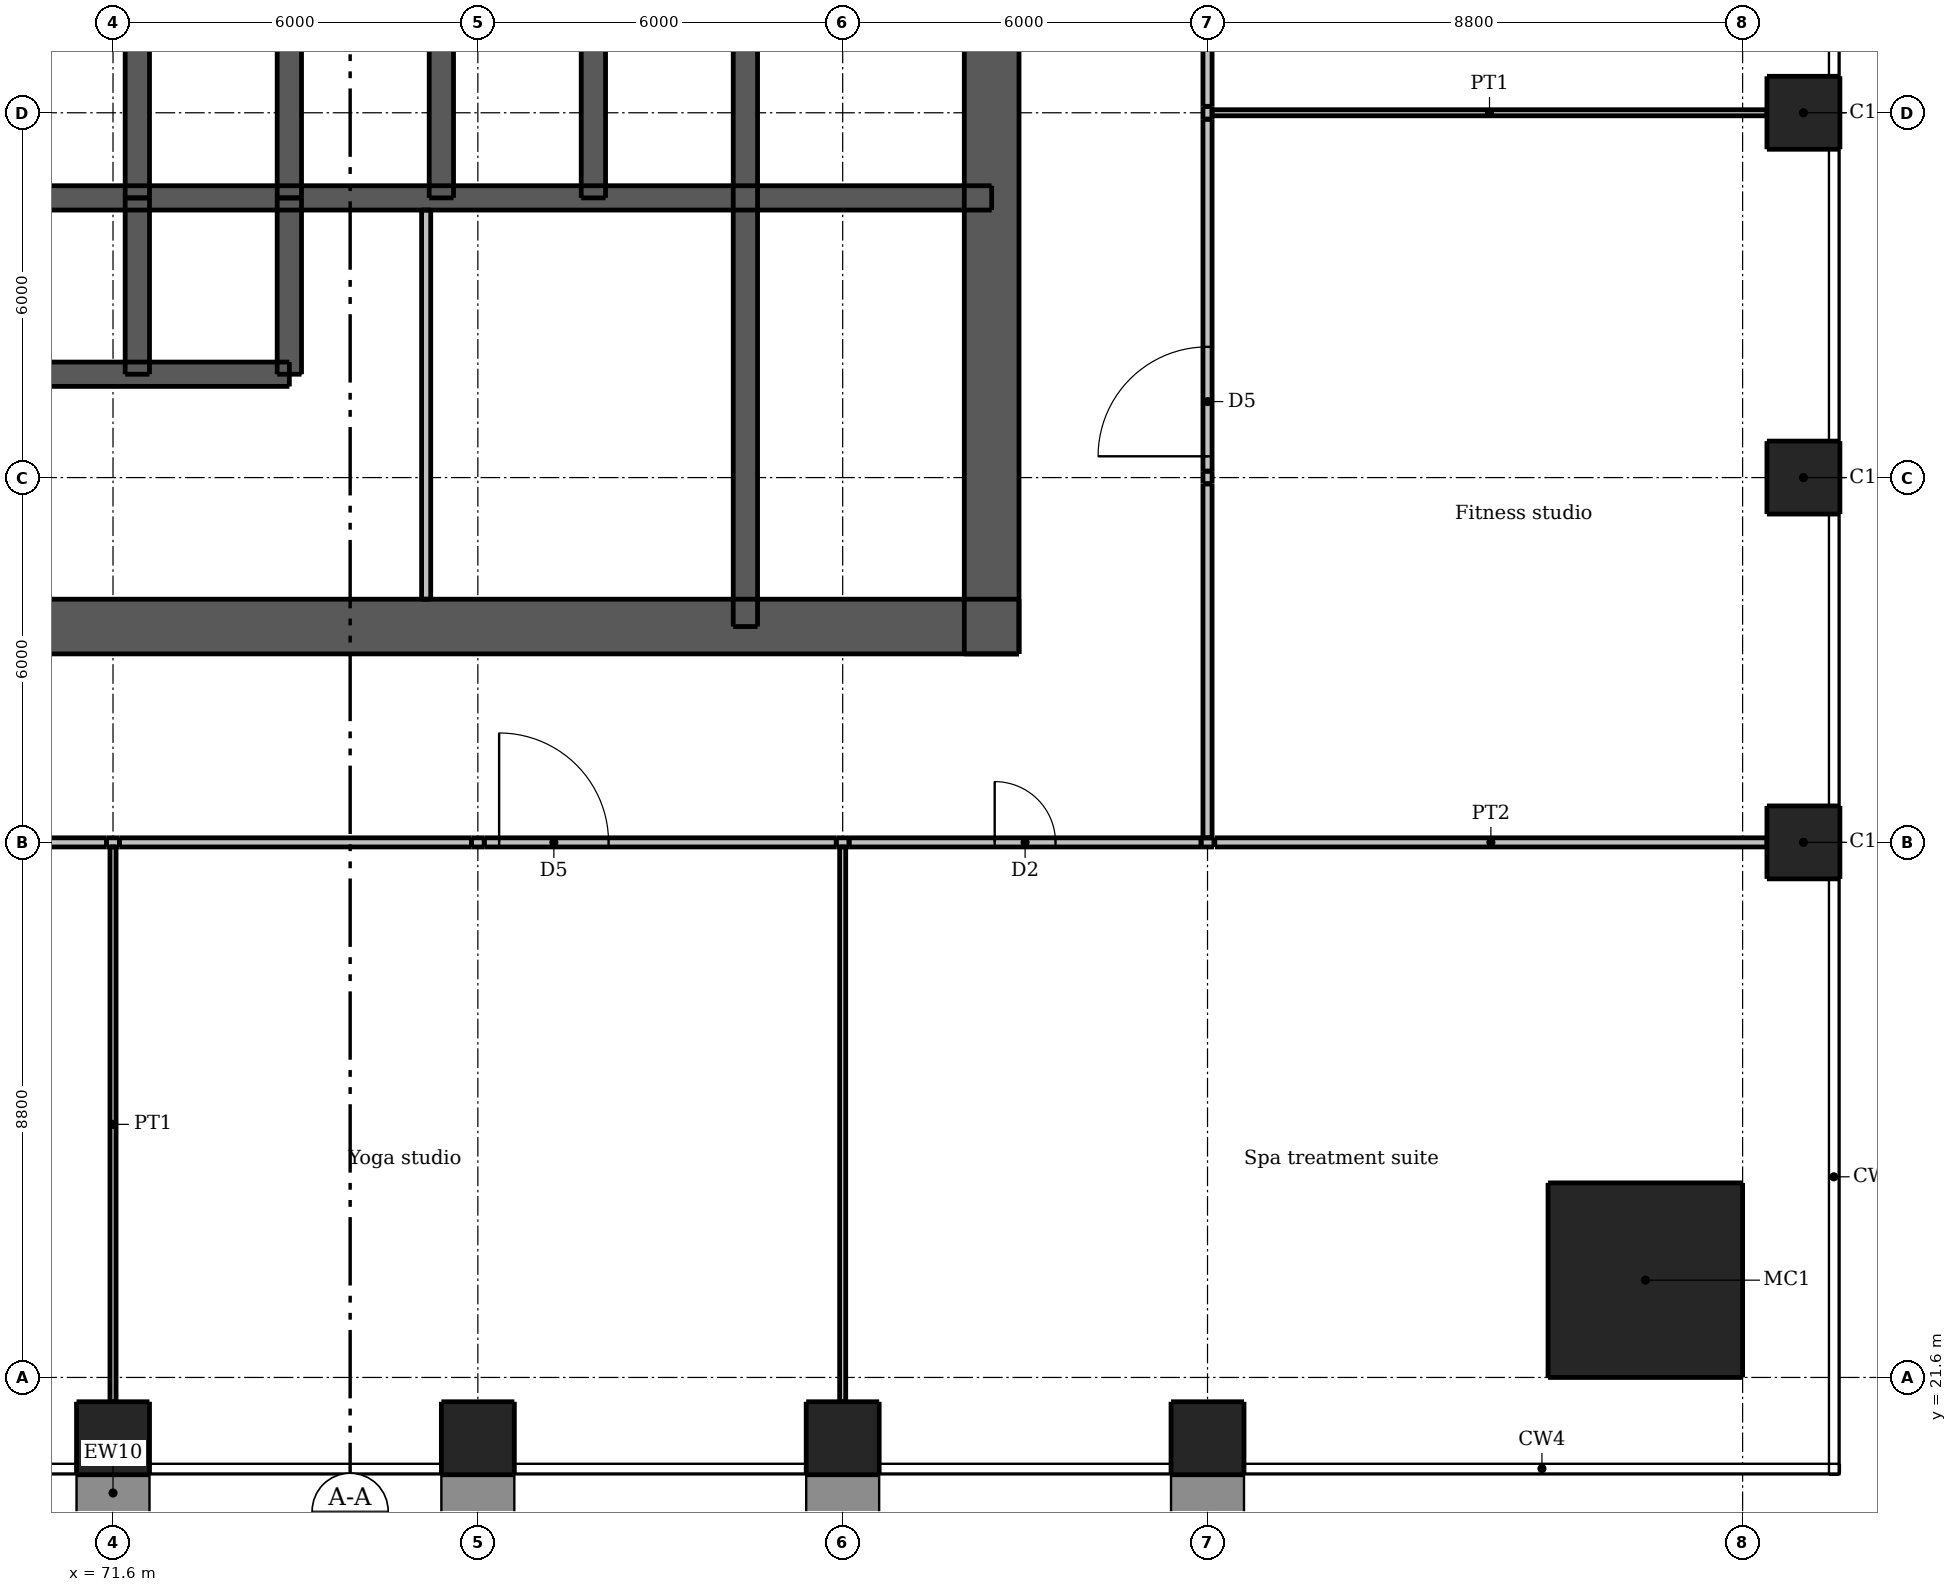
"""IFC4 building model, lengths in metres.
Left out: names, types, materials, properties, quantities, classifications, styles, units other than length and angle.
Written with IfcOpenShell. Run it as: python <this file> out.ifc"""

import sys

from ifc_helpers import new_model, si_unit, direction, frame, frame_2d, origin, origin_2d, place, context, subcontext, project, spatial, rectangle, extrude, element, fill, save


model = new_model("IFC4")
c1 = context("Model", 3, precision=1e-05, world=origin(), true_north=direction((0.0, 1.0)))
c2 = subcontext(c1, "Body", "Model", "MODEL_VIEW")
j1 = project(units=[si_unit("LENGTHUNIT", "METRE"), si_unit("PLANEANGLEUNIT", "RADIAN")], contexts=[c1])
p1 = place(None, origin())
s1 = spatial("IfcSite", under=j1, at=p1, CompositionType="ELEMENT")
p2 = place(p1, origin())
s2 = spatial("IfcBuilding", under=s1, at=p2, CompositionType="ELEMENT")
p3 = place(p2, frame((0.0, 0.0, 10.0)))
s3 = spatial("IfcBuildingStorey", under=s2, at=p3, CompositionType="ELEMENT", Elevation=10.0)
p4 = place(p3, frame((62.5, 33.95, 0.0), z_axis=(0.0, 0.0, 1.0), x_axis=(1.0, 0.0, 0.0)))
e1 = element("IfcWall", 1, at=p4, inside=s3, PredefinedType="SHEAR", context=c2, shape_type="SweptSolid", body=[
    extrude(rectangle(XDim=24.0, YDim=0.9, at=frame_2d((12.0, 0.0))), origin(), (0.0, 0.0, 1.0), 4.2),
])
p5 = place(p4, frame((2.05, 0.0, 0.0)))
e2 = element("IfcOpeningElement", 2, at=p5, cuts=e1, PredefinedType="OPENING", context=c2, shape_type="SweptSolid", body=[
    extrude(rectangle(XDim=1.1, YDim=2.1, at=frame_2d((0.55, 1.05))), frame((0.0, 0.46, 0.0), z_axis=(0.0, -1.0, 0.0), x_axis=(1.0, 0.0, 0.0)), (0.0, 0.0, 1.0), 0.92),
])
p6 = place(p4, frame((20.85, 0.0, 0.0)))
e3 = element("IfcOpeningElement", 3, at=p6, cuts=e1, PredefinedType="OPENING", context=c2, shape_type="SweptSolid", body=[
    extrude(rectangle(XDim=1.1, YDim=2.1, at=frame_2d((0.55, 1.05))), frame((0.0, 0.46, 0.0), z_axis=(0.0, -1.0, 0.0), x_axis=(1.0, 0.0, 0.0)), (0.0, 0.0, 1.0), 0.92),
])
p7 = place(p4, frame((8.0, 0.0, 0.0)))
e4 = element("IfcOpeningElement", 4, at=p7, cuts=e1, PredefinedType="OPENING", context=c2, shape_type="SweptSolid", body=[
    extrude(rectangle(XDim=1.1, YDim=2.1, at=frame_2d((0.55, 1.05))), frame((0.0, 0.46, 0.0), z_axis=(0.0, -1.0, 0.0), x_axis=(1.0, 0.0, 0.0)), (0.0, 0.0, 1.0), 0.92),
])
p8 = place(p4, frame((16.363, 0.0, 0.0)))
e5 = element("IfcOpeningElement", 5, at=p8, cuts=e1, PredefinedType="OPENING", context=c2, shape_type="SweptSolid", body=[
    extrude(rectangle(XDim=0.9, YDim=2.1, at=frame_2d((0.45, 1.05))), frame((0.0, 0.46, 0.0), z_axis=(0.0, -1.0, 0.0), x_axis=(1.0, 0.0, 0.0)), (0.0, 0.0, 1.0), 0.92),
])
p9 = place(p3, frame((86.05, 33.5, 0.0), z_axis=(0.0, 0.0, 1.0), x_axis=(0.0, 1.0, 0.0)))
e6 = element("IfcWall", 6, at=p9, inside=s3, PredefinedType="SHEAR", context=c2, shape_type="SweptSolid", body=[
    extrude(rectangle(XDim=24.0, YDim=0.9, at=frame_2d((12.0, 0.0))), origin(), (0.0, 0.0, 1.0), 4.2),
])
p10 = place(p9, frame((11.2, 0.0, 0.0)))
e7 = element("IfcOpeningElement", 7, at=p10, cuts=e6, PredefinedType="OPENING", context=c2, shape_type="SweptSolid", body=[
    extrude(rectangle(XDim=1.6, YDim=2.1, at=frame_2d((0.8, 1.05))), frame((0.0, 0.46, 0.0), z_axis=(0.0, -1.0, 0.0), x_axis=(1.0, 0.0, 0.0)), (0.0, 0.0, 1.0), 0.92),
])
p11 = place(p3, frame((62.95, 41.0, 0.0), z_axis=(0.0, 0.0, 1.0), x_axis=(1.0, 0.0, 0.0)))
e8 = element("IfcWall", 8, at=p11, inside=s3, PredefinedType="SHEAR", context=c2, shape_type="SweptSolid", body=[
    extrude(rectangle(XDim=23.1, YDim=0.4, at=frame_2d((11.55, 0.0))), origin(), (0.0, 0.0, 1.0), 4.2),
])
p12 = place(p3, frame((82.0, 33.95, 0.0), z_axis=(0.0, 0.0, 1.0), x_axis=(0.0, 1.0, 0.0)))
e9 = element("IfcWall", 9, at=p12, inside=s3, PredefinedType="SHEAR", context=c2, shape_type="SweptSolid", body=[
    extrude(rectangle(XDim=9.95, YDim=0.4, at=frame_2d((4.975, 0.0))), origin(), (0.0, 0.0, 1.0), 4.2),
])
for number, where, z_axis, x_axis in (
    (10, (72.0, 41.0, 0.0), (0.0, 0.0, 1.0), (0.0, 1.0, 0.0)),
    (11, (74.5, 41.0, 0.0), (0.0, 0.0, 1.0), (0.0, 1.0, 0.0)),
    (12, (77.0, 41.0, 0.0), (0.0, 0.0, 1.0), (0.0, 1.0, 0.0)),
    (13, (79.5, 41.0, 0.0), (0.0, 0.0, 1.0), (0.0, 1.0, 0.0)),
):
    element("IfcWall", number, at=place(p3, frame(where, z_axis=z_axis, x_axis=x_axis)), inside=s3, PredefinedType="SHEAR", context=c2, shape_type="SweptSolid", body=[
        extrude(rectangle(XDim=2.9, YDim=0.4, at=frame_2d((1.45, 0.0))), origin(), (0.0, 0.0, 1.0), 4.2),
    ])
p13 = place(p3, frame((67.0, 38.1, 0.0), z_axis=(0.0, 0.0, 1.0), x_axis=(1.0, 0.0, 0.0)))
e14 = element("IfcWall", 14, at=p13, inside=s3, PredefinedType="SHEAR", context=c2, shape_type="SweptSolid", body=[
    extrude(rectangle(XDim=7.5, YDim=0.4, at=frame_2d((3.75, 0.0))), origin(), (0.0, 0.0, 1.0), 4.2),
])
p14 = place(p13, frame((0.7, 0.0, 0.0)))
e15 = element("IfcOpeningElement", 15, at=p14, cuts=e14, PredefinedType="OPENING", context=c2, shape_type="SweptSolid", body=[
    extrude(rectangle(XDim=1.1, YDim=2.1, at=frame_2d((0.55, 1.05))), frame((0.0, 0.21, 0.0), z_axis=(0.0, -1.0, 0.0), x_axis=(1.0, 0.0, 0.0)), (0.0, 0.0, 1.0), 0.42),
])
p15 = place(p13, frame((3.2, 0.0, 0.0)))
e16 = element("IfcOpeningElement", 16, at=p15, cuts=e14, PredefinedType="OPENING", context=c2, shape_type="SweptSolid", body=[
    extrude(rectangle(XDim=1.1, YDim=2.1, at=frame_2d((0.55, 1.05))), frame((0.0, 0.21, 0.0), z_axis=(0.0, -1.0, 0.0), x_axis=(1.0, 0.0, 0.0)), (0.0, 0.0, 1.0), 0.42),
])
p16 = place(p13, frame((5.65, 0.0, 0.0)))
e17 = element("IfcOpeningElement", 17, at=p16, cuts=e14, PredefinedType="OPENING", context=c2, shape_type="SweptSolid", body=[
    extrude(rectangle(XDim=1.2, YDim=2.1, at=frame_2d((0.6, 1.05))), frame((0.0, 0.21, 0.0), z_axis=(0.0, -1.0, 0.0), x_axis=(1.0, 0.0, 0.0)), (0.0, 0.0, 1.0), 0.42),
])
for number, where, z_axis, x_axis in (
    (18, (72.0, 38.1, 0.0), (0.0, 0.0, 1.0), (0.0, 1.0, 0.0)),
    (19, (74.5, 38.1, 0.0), (0.0, 0.0, 1.0), (0.0, 1.0, 0.0)),
):
    element("IfcWall", number, at=place(p3, frame(where, z_axis=z_axis, x_axis=x_axis)), inside=s3, PredefinedType="SHEAR", context=c2, shape_type="SweptSolid", body=[
        extrude(rectangle(XDim=2.9, YDim=0.4, at=frame_2d((1.45, 0.0))), origin(), (0.0, 0.0, 1.0), 4.2),
    ])
for number, where, z_axis, x_axis in (
    (20, (71.6, 20.6, 0.0), (0.0, 0.0, 1.0), (1.0, 0.0, 0.0)),
    (21, (77.6, 20.6, 0.0), (0.0, 0.0, 1.0), (1.0, 0.0, 0.0)),
    (22, (83.6, 20.6, 0.0), (0.0, 0.0, 1.0), (1.0, 0.0, 0.0)),
    (23, (89.6, 20.6, 0.0), (0.0, 0.0, 1.0), (1.0, 0.0, 0.0)),
    (24, (99.4, 30.4, 0.0), (0.0, 0.0, 1.0), (1.0, 0.0, 0.0)),
    (25, (99.4, 36.4, 0.0), (0.0, 0.0, 1.0), (1.0, 0.0, 0.0)),
    (26, (99.4, 42.4, 0.0), (0.0, 0.0, 1.0), (1.0, 0.0, 0.0)),
):
    element("IfcColumn", number, at=place(p3, frame(where, z_axis=z_axis, x_axis=x_axis)), inside=s3, PredefinedType="COLUMN", context=c2, shape_type="SweptSolid", body=[
        extrude(rectangle(XDim=1.2, YDim=1.2, at=origin_2d()), origin(), (0.0, 0.0, 1.0), 4.2),
    ])
p17 = place(p3, frame((96.8, 23.2, 0.0), z_axis=(0.0, 0.0, 1.0), x_axis=(1.0, 0.0, 0.0)))
e27 = element("IfcColumn", 27, at=p17, inside=s3, PredefinedType="COLUMN", context=c2, shape_type="SweptSolid", body=[
    extrude(rectangle(XDim=3.2, YDim=3.2, at=origin_2d()), origin(), (0.0, 0.0, 1.0), 4.2),
])
p18 = place(p3, frame((76.75, 34.4, 0.0), z_axis=(0.0, 0.0, 1.0), x_axis=(0.0, 1.0, 0.0)))
e28 = element("IfcWall", 28, at=p18, inside=s3, PredefinedType="PLUMBINGWALL", context=c2, shape_type="SweptSolid", body=[
    extrude(rectangle(XDim=6.4, YDim=0.15, at=frame_2d((3.2, 0.0))), origin(), (0.0, 0.0, 1.0), 4.2),
])
p19 = place(p3, frame((65.705, 30.4, 0.0), z_axis=(0.0, 0.0, 1.0), x_axis=(1.0, 0.0, 0.0)))
e29 = element("IfcWall", 29, at=p19, inside=s3, PredefinedType="PARTITIONING", context=c2, shape_type="SweptSolid", body=[
    extrude(rectangle(XDim=5.789, YDim=0.15, at=frame_2d((2.895, 0.0))), origin(), (0.0, 0.0, 1.0), 4.2),
])
p20 = place(p19, frame((0.245, 0.0, 0.0)))
e30 = element("IfcOpeningElement", 30, at=p20, cuts=e29, PredefinedType="OPENING", context=c2, shape_type="SweptSolid", body=[
    extrude(rectangle(XDim=1.8, YDim=2.1, at=frame_2d((0.9, 1.05))), frame((0.0, 0.085, 0.0), z_axis=(0.0, -1.0, 0.0), x_axis=(1.0, 0.0, 0.0)), (0.0, 0.0, 1.0), 0.17),
])
p21 = place(p3, frame((71.495, 30.4, 0.0), z_axis=(0.0, 0.0, 1.0), x_axis=(1.0, 0.0, 0.0)))
e31 = element("IfcWall", 31, at=p21, inside=s3, PredefinedType="PARTITIONING", context=c2, shape_type="SweptSolid", body=[
    extrude(rectangle(XDim=0.211, YDim=0.15, at=frame_2d((0.105, 0.0))), origin(), (0.0, 0.0, 1.0), 3.66),
])
p22 = place(p3, frame((71.705, 30.4, 0.0), z_axis=(0.0, 0.0, 1.0), x_axis=(1.0, 0.0, 0.0)))
e32 = element("IfcWall", 32, at=p22, inside=s3, PredefinedType="PARTITIONING", context=c2, shape_type="SweptSolid", body=[
    extrude(rectangle(XDim=5.789, YDim=0.15, at=frame_2d((2.895, 0.0))), origin(), (0.0, 0.0, 1.0), 4.2),
])
p23 = place(p3, frame((77.495, 30.4, 0.0), z_axis=(0.0, 0.0, 1.0), x_axis=(1.0, 0.0, 0.0)))
e33 = element("IfcWall", 33, at=p23, inside=s3, PredefinedType="PARTITIONING", context=c2, shape_type="SweptSolid", body=[
    extrude(rectangle(XDim=0.211, YDim=0.15, at=frame_2d((0.105, 0.0))), origin(), (0.0, 0.0, 1.0), 3.66),
])
p24 = place(p3, frame((77.705, 30.4, 0.0), z_axis=(0.0, 0.0, 1.0), x_axis=(1.0, 0.0, 0.0)))
e34 = element("IfcWall", 34, at=p24, inside=s3, PredefinedType="PARTITIONING", context=c2, shape_type="SweptSolid", body=[
    extrude(rectangle(XDim=5.789, YDim=0.15, at=frame_2d((2.895, 0.0))), origin(), (0.0, 0.0, 1.0), 4.2),
])
p25 = place(p24, frame((0.245, 0.0, 0.0)))
e35 = element("IfcOpeningElement", 35, at=p25, cuts=e34, PredefinedType="OPENING", context=c2, shape_type="SweptSolid", body=[
    extrude(rectangle(XDim=1.8, YDim=2.1, at=frame_2d((0.9, 1.05))), frame((0.0, 0.085, 0.0), z_axis=(0.0, -1.0, 0.0), x_axis=(1.0, 0.0, 0.0)), (0.0, 0.0, 1.0), 0.17),
])
p26 = place(p3, frame((83.495, 30.4, 0.0), z_axis=(0.0, 0.0, 1.0), x_axis=(1.0, 0.0, 0.0)))
e36 = element("IfcWall", 36, at=p26, inside=s3, PredefinedType="PARTITIONING", context=c2, shape_type="SweptSolid", body=[
    extrude(rectangle(XDim=0.211, YDim=0.15, at=frame_2d((0.105, 0.0))), origin(), (0.0, 0.0, 1.0), 3.66),
])
p27 = place(p3, frame((83.705, 30.4, 0.0), z_axis=(0.0, 0.0, 1.0), x_axis=(1.0, 0.0, 0.0)))
e37 = element("IfcWall", 37, at=p27, inside=s3, PredefinedType="PARTITIONING", context=c2, shape_type="SweptSolid", body=[
    extrude(rectangle(XDim=5.789, YDim=0.15, at=frame_2d((2.895, 0.0))), origin(), (0.0, 0.0, 1.0), 4.2),
])
p28 = place(p27, frame((2.395, 0.0, 0.0)))
e38 = element("IfcOpeningElement", 38, at=p28, cuts=e37, PredefinedType="OPENING", context=c2, shape_type="SweptSolid", body=[
    extrude(rectangle(XDim=1.0, YDim=2.1, at=frame_2d((0.5, 1.05))), frame((0.0, 0.085, 0.0), z_axis=(0.0, -1.0, 0.0), x_axis=(1.0, 0.0, 0.0)), (0.0, 0.0, 1.0), 0.17),
])
p29 = place(p3, frame((89.495, 30.4, 0.0), z_axis=(0.0, 0.0, 1.0), x_axis=(1.0, 0.0, 0.0)))
e39 = element("IfcWall", 39, at=p29, inside=s3, PredefinedType="PARTITIONING", context=c2, shape_type="SweptSolid", body=[
    extrude(rectangle(XDim=0.211, YDim=0.15, at=frame_2d((0.105, 0.0))), origin(), (0.0, 0.0, 1.0), 3.66),
])
p30 = place(p3, frame((89.72, 30.4, 0.0), z_axis=(0.0, 0.0, 1.0), x_axis=(1.0, 0.0, 0.0)))
e40 = element("IfcWall", 40, at=p30, inside=s3, PredefinedType="PARTITIONING", context=c2, shape_type="SweptSolid", body=[
    extrude(rectangle(XDim=9.08, YDim=0.15, at=frame_2d((4.54, 0.0))), origin(), (0.0, 0.0, 1.0), 3.667),
])
for number, where, z_axis, x_axis in (
    (41, (89.675, 42.4, 0.0), (0.0, 0.0, 1.0), (1.0, 0.0, 0.0)),
    (42, (71.6, 21.2, 0.0), (0.0, 0.0, 1.0), (0.0, 1.0, 0.0)),
    (43, (83.6, 21.2, 0.0), (0.0, 0.0, 1.0), (0.0, 1.0, 0.0)),
):
    element("IfcWall", number, at=place(p3, frame(where, z_axis=z_axis, x_axis=x_axis)), inside=s3, PredefinedType="PARTITIONING", context=c2, shape_type="SweptSolid", body=[
        extrude(rectangle(XDim=9.125, YDim=0.1, at=frame_2d((4.562, 0.0))), origin(), (0.0, 0.0, 1.0), 3.66),
    ])
p31 = place(p3, frame((89.6, 30.475, 0.0), z_axis=(0.0, 0.0, 1.0), x_axis=(0.0, 1.0, 0.0)))
e44 = element("IfcWall", 44, at=p31, inside=s3, PredefinedType="PARTITIONING", context=c2, shape_type="SweptSolid", body=[
    extrude(rectangle(XDim=5.82, YDim=0.15, at=frame_2d((2.91, 0.0))), origin(), (0.0, 0.0, 1.0), 3.66),
])
p32 = place(p3, frame((89.6, 36.3, 0.0), z_axis=(0.0, 0.0, 1.0), x_axis=(0.0, 1.0, 0.0)))
e45 = element("IfcWall", 45, at=p32, inside=s3, PredefinedType="PARTITIONING", context=c2, shape_type="SweptSolid", body=[
    extrude(rectangle(XDim=0.206, YDim=0.15, at=frame_2d((0.103, 0.0))), origin(), (0.0, 0.0, 1.0), 3.66),
])
p33 = place(p3, frame((89.6, 36.505, 0.0), z_axis=(0.0, 0.0, 1.0), x_axis=(0.0, 1.0, 0.0)))
e46 = element("IfcWall", 46, at=p33, inside=s3, PredefinedType="PARTITIONING", context=c2, shape_type="SweptSolid", body=[
    extrude(rectangle(XDim=5.789, YDim=0.15, at=frame_2d((2.895, 0.0))), origin(), (0.0, 0.0, 1.0), 4.2),
])
p34 = place(p33, frame((0.245, 0.0, 0.0)))
e47 = element("IfcOpeningElement", 47, at=p34, cuts=e46, PredefinedType="OPENING", context=c2, shape_type="SweptSolid", body=[
    extrude(rectangle(XDim=1.8, YDim=2.1, at=frame_2d((0.9, 1.05))), frame((0.0, 0.085, 0.0), z_axis=(0.0, -1.0, 0.0), x_axis=(1.0, 0.0, 0.0)), (0.0, 0.0, 1.0), 0.17),
])
p35 = place(p3, frame((89.6, 42.295, 0.0), z_axis=(0.0, 0.0, 1.0), x_axis=(0.0, 1.0, 0.0)))
e48 = element("IfcWall", 48, at=p35, inside=s3, PredefinedType="PARTITIONING", context=c2, shape_type="SweptSolid", body=[
    extrude(rectangle(XDim=0.211, YDim=0.15, at=frame_2d((0.105, 0.0))), origin(), (0.0, 0.0, 1.0), 3.66),
])
p36 = place(p3, frame((89.6, 42.505, 0.0), z_axis=(0.0, 0.0, 1.0), x_axis=(0.0, 1.0, 0.0)))
e49 = element("IfcWall", 49, at=p36, inside=s3, PredefinedType="PARTITIONING", context=c2, shape_type="SweptSolid", body=[
    extrude(rectangle(XDim=5.789, YDim=0.15, at=frame_2d((2.895, 0.0))), origin(), (0.0, 0.0, 1.0), 4.2),
])
p37 = place(p6, origin())
e50 = element("IfcDoor", 50, at=p37, inside=s3, OperationType="SINGLE_SWING_RIGHT", PredefinedType="DOOR", context=c2, shape_type="SweptSolid", body=[
    extrude(rectangle(XDim=1.1, YDim=2.1, at=frame_2d((0.55, 1.05))), frame((0.0, 0.438, 0.0), z_axis=(0.0, -1.0, 0.0), x_axis=(1.0, 0.0, 0.0)), (0.0, 0.0, 1.0), 0.05),
])
fill(e3, e50)
p38 = place(p7, origin())
e51 = element("IfcDoor", 51, at=p38, inside=s3, OperationType="SINGLE_SWING_LEFT", PredefinedType="DOOR", context=c2, shape_type="SweptSolid", body=[
    extrude(rectangle(XDim=1.1, YDim=2.1, at=frame_2d((0.55, 1.05))), frame((0.0, 0.438, 0.0), z_axis=(0.0, -1.0, 0.0), x_axis=(1.0, 0.0, 0.0)), (0.0, 0.0, 1.0), 0.05),
])
fill(e4, e51)
p39 = place(p8, origin())
e52 = element("IfcDoor", 52, at=p39, inside=s3, OperationType="SINGLE_SWING_LEFT", PredefinedType="DOOR", context=c2, shape_type="SweptSolid", body=[
    extrude(rectangle(XDim=0.9, YDim=2.1, at=frame_2d((0.45, 1.05))), frame((0.0, 0.438, 0.0), z_axis=(0.0, -1.0, 0.0), x_axis=(1.0, 0.0, 0.0)), (0.0, 0.0, 1.0), 0.05),
])
fill(e5, e52)
p40 = place(p15, origin())
e53 = element("IfcDoor", 53, at=p40, inside=s3, OperationType="DOUBLE_DOOR_SLIDING", PredefinedType="DOOR", context=c2, shape_type="SweptSolid", body=[
    extrude(rectangle(XDim=1.1, YDim=2.1, at=frame_2d((0.55, 1.05))), frame((0.0, 0.025, 0.0), z_axis=(0.0, -1.0, 0.0), x_axis=(1.0, 0.0, 0.0)), (0.0, 0.0, 1.0), 0.05),
])
fill(e16, e53)
p41 = place(p16, origin())
e54 = element("IfcDoor", 54, at=p41, inside=s3, OperationType="DOUBLE_DOOR_SLIDING", PredefinedType="DOOR", context=c2, shape_type="SweptSolid", body=[
    extrude(rectangle(XDim=1.2, YDim=2.1, at=frame_2d((0.6, 1.05))), frame((0.0, 0.025, 0.0), z_axis=(0.0, -1.0, 0.0), x_axis=(1.0, 0.0, 0.0)), (0.0, 0.0, 1.0), 0.05),
])
fill(e17, e54)
p42 = place(p25, origin())
e55 = element("IfcDoor", 55, at=p42, inside=s3, OperationType="DOUBLE_DOOR_SINGLE_SWING", PredefinedType="DOOR", context=c2, shape_type="SweptSolid", body=[
    extrude(rectangle(XDim=1.8, YDim=2.1, at=frame_2d((0.9, 1.05))), frame((0.0, 0.025, 0.0), z_axis=(0.0, -1.0, 0.0), x_axis=(1.0, 0.0, 0.0)), (0.0, 0.0, 1.0), 0.05),
])
fill(e35, e55)
p43 = place(p28, origin())
e56 = element("IfcDoor", 56, at=p43, inside=s3, OperationType="SINGLE_SWING_LEFT", PredefinedType="DOOR", context=c2, shape_type="SweptSolid", body=[
    extrude(rectangle(XDim=1.0, YDim=2.1, at=frame_2d((0.5, 1.05))), frame((0.0, 0.025, 0.0), z_axis=(0.0, -1.0, 0.0), x_axis=(1.0, 0.0, 0.0)), (0.0, 0.0, 1.0), 0.05),
])
fill(e38, e56)
p44 = place(p34, origin())
e57 = element("IfcDoor", 57, at=p44, inside=s3, OperationType="DOUBLE_DOOR_SINGLE_SWING", PredefinedType="DOOR", context=c2, shape_type="SweptSolid", body=[
    extrude(rectangle(XDim=1.8, YDim=2.1, at=frame_2d((0.9, 1.05))), frame((0.0, 0.025, 0.0), z_axis=(0.0, -1.0, 0.0), x_axis=(1.0, 0.0, 0.0)), (0.0, 0.0, 1.0), 0.05),
])
fill(e47, e57)
save(model, sys.argv[1])
